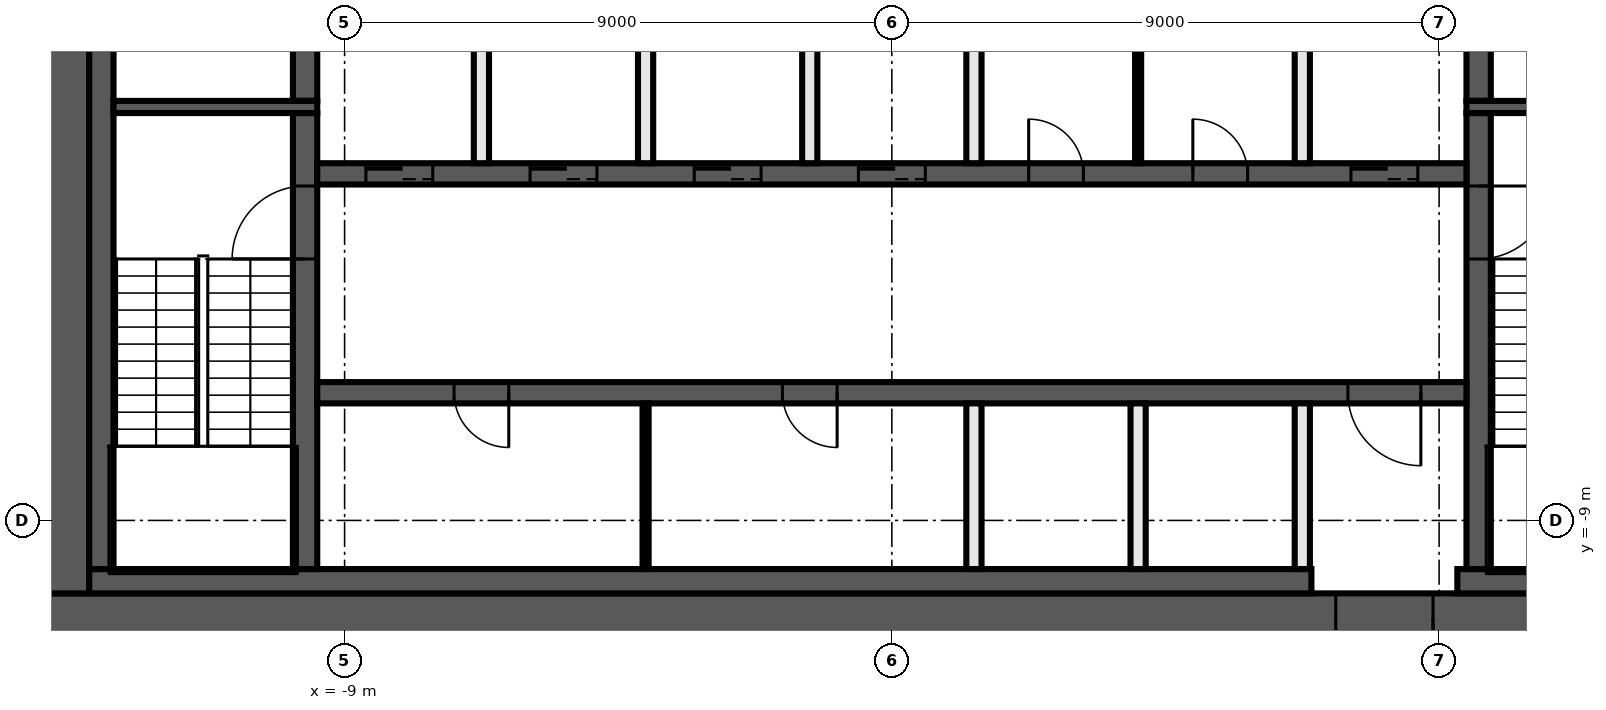
"""IFC4 building model, lengths in metres.
Left out: names, types, materials, properties, quantities, classifications, styles, units other than length and angle.
Written with IfcOpenShell. Run it as: python <this file> out.ifc"""

import sys

from ifc_helpers import new_model, si_unit, direction, frame, frame_2d, origin, place, context, subcontext, project, spatial, rectangle, extrude, element, fill, save


model = new_model("IFC4")
c1 = context("Model", 3, precision=1e-05, world=origin(), true_north=direction((0.0, 1.0)))
c2 = subcontext(c1, "Body", "Model", "MODEL_VIEW")
j1 = project(units=[si_unit("LENGTHUNIT", "METRE"), si_unit("PLANEANGLEUNIT", "RADIAN")], contexts=[c1])
p1 = place(None, origin())
s1 = spatial("IfcSite", under=j1, at=p1, CompositionType="ELEMENT")
p2 = place(p1, origin())
s2 = spatial("IfcBuilding", under=s1, at=p2, CompositionType="ELEMENT")
p3 = place(p2, frame((0.0, 0.0, 158.6)))
s3 = spatial("IfcBuildingStorey", under=s2, at=p3, CompositionType="ELEMENT", Elevation=158.6)
p4 = place(p3, frame((14.0, -10.6, 0.0), z_axis=(0.0, 0.0, 1.0), x_axis=(-1.0, 0.0, 0.0)))
e1 = element("IfcWall", 1, at=p4, inside=s3, PredefinedType="SHEAR", context=c2, shape_type="SweptSolid", body=[
    extrude(rectangle(XDim=28.0, YDim=0.8, at=frame_2d((14.0, 0.0))), origin(), (0.0, 0.0, 1.0), 3.82),
])
p5 = place(p4, frame((5.1, 0.0, 0.0)))
e2 = element("IfcOpeningElement", 2, at=p5, cuts=e1, PredefinedType="OPENING", context=c2, shape_type="SweptSolid", body=[
    extrude(rectangle(XDim=1.6, YDim=2.1, at=frame_2d((0.8, 1.05))), frame((0.0, 0.41, 0.0), z_axis=(0.0, -1.0, 0.0), x_axis=(1.0, 0.0, 0.0)), (0.0, 0.0, 1.0), 0.82),
])
p6 = place(p3, frame((-13.6, -10.2, 0.0), z_axis=(0.0, 0.0, 1.0), x_axis=(0.0, 1.0, 0.0)))
e3 = element("IfcWall", 3, at=p6, inside=s3, PredefinedType="SHEAR", context=c2, shape_type="SweptSolid", body=[
    extrude(rectangle(XDim=20.4, YDim=0.8, at=frame_2d((10.2, 0.0))), origin(), (0.0, 0.0, 1.0), 3.82),
])
p7 = place(p3, frame((13.2, -10.0, 0.0), z_axis=(0.0, 0.0, 1.0), x_axis=(-1.0, 0.0, 0.0)))
e4 = element("IfcWall", 4, at=p7, inside=s3, PredefinedType="SHEAR", context=c2, shape_type="SweptSolid", body=[
    extrude(rectangle(XDim=3.9, YDim=0.4, at=frame_2d((1.95, 0.0))), origin(), (0.0, 0.0, 1.0), 3.82),
])
p8 = place(p3, frame((6.9, -10.0, 0.0), z_axis=(0.0, 0.0, 1.0), x_axis=(-1.0, 0.0, 0.0)))
e5 = element("IfcWall", 5, at=p8, inside=s3, PredefinedType="SHEAR", context=c2, shape_type="SweptSolid", body=[
    extrude(rectangle(XDim=20.1, YDim=0.4, at=frame_2d((10.05, 0.0))), origin(), (0.0, 0.0, 1.0), 3.82),
])
p9 = place(p3, frame((-13.0, -9.8, 0.0), z_axis=(0.0, 0.0, 1.0), x_axis=(0.0, 1.0, 0.0)))
e6 = element("IfcWall", 6, at=p9, inside=s3, PredefinedType="SHEAR", context=c2, shape_type="SweptSolid", body=[
    extrude(rectangle(XDim=19.6, YDim=0.4, at=frame_2d((9.8, 0.0))), origin(), (0.0, 0.0, 1.0), 3.82),
])
p10 = place(p3, frame((9.65, -2.3, 0.0), z_axis=(0.0, 0.0, 1.0), x_axis=(0.0, -1.0, 0.0)))
e7 = element("IfcWall", 7, at=p10, inside=s3, PredefinedType="SHEAR", context=c2, shape_type="SweptSolid", body=[
    extrude(rectangle(XDim=7.5, YDim=0.4, at=frame_2d((3.75, 0.0))), origin(), (0.0, 0.0, 1.0), 3.82),
])
p11 = place(p10, frame((1.2, 0.0, 0.0)))
e8 = element("IfcOpeningElement", 8, at=p11, cuts=e7, PredefinedType="OPENING", context=c2, shape_type="SweptSolid", body=[
    extrude(rectangle(XDim=1.2, YDim=2.1, at=frame_2d((0.6, 1.05))), frame((0.0, 0.21, 0.0), z_axis=(0.0, -1.0, 0.0), x_axis=(1.0, 0.0, 0.0)), (0.0, 0.0, 1.0), 0.42),
])
p12 = place(p3, frame((9.65, 2.1, 0.0), z_axis=(0.0, 0.0, 1.0), x_axis=(0.0, -1.0, 0.0)))
e9 = element("IfcWall", 9, at=p12, inside=s3, PredefinedType="SHEAR", context=c2, shape_type="SweptSolid", body=[
    extrude(rectangle(XDim=4.2, YDim=0.4, at=frame_2d((2.1, 0.0))), origin(), (0.0, 0.0, 1.0), 3.82),
])
p13 = place(p12, frame((0.15, 0.0, 0.0)))
e10 = element("IfcOpeningElement", 10, at=p13, cuts=e9, PredefinedType="OPENING", context=c2, shape_type="SweptSolid", body=[
    extrude(rectangle(XDim=0.9, YDim=2.1, at=frame_2d((0.45, 1.05))), frame((0.0, 0.21, 0.0), z_axis=(0.0, -1.0, 0.0), x_axis=(1.0, 0.0, 0.0)), (0.0, 0.0, 1.0), 0.42),
])
p14 = place(p3, frame((-9.65, -9.8, 0.0), z_axis=(0.0, 0.0, 1.0), x_axis=(0.0, 1.0, 0.0)))
e11 = element("IfcWall", 11, at=p14, inside=s3, PredefinedType="SHEAR", context=c2, shape_type="SweptSolid", body=[
    extrude(rectangle(XDim=7.5, YDim=0.4, at=frame_2d((3.75, 0.0))), origin(), (0.0, 0.0, 1.0), 3.82),
])
p15 = place(p14, frame((5.1, 0.0, 0.0)))
e12 = element("IfcOpeningElement", 12, at=p15, cuts=e11, PredefinedType="OPENING", context=c2, shape_type="SweptSolid", body=[
    extrude(rectangle(XDim=1.2, YDim=2.1, at=frame_2d((0.6, 1.05))), frame((0.0, 0.21, 0.0), z_axis=(0.0, -1.0, 0.0), x_axis=(1.0, 0.0, 0.0)), (0.0, 0.0, 1.0), 0.42),
])
p16 = place(p3, frame((-9.65, -2.1, 0.0), z_axis=(0.0, 0.0, 1.0), x_axis=(0.0, 1.0, 0.0)))
e13 = element("IfcWall", 13, at=p16, inside=s3, PredefinedType="SHEAR", context=c2, shape_type="SweptSolid", body=[
    extrude(rectangle(XDim=4.2, YDim=0.4, at=frame_2d((2.1, 0.0))), origin(), (0.0, 0.0, 1.0), 3.82),
])
for number, where, z_axis, x_axis in (
    (14, (9.45, -2.2, 0.0), (0.0, 0.0, 1.0), (1.0, 0.0, 0.0)),
    (15, (-9.45, -2.2, 0.0), (0.0, 0.0, 1.0), (-1.0, 0.0, 0.0)),
):
    element("IfcWall", number, at=place(p3, frame(where, z_axis=z_axis, x_axis=x_axis)), inside=s3, PredefinedType="SHEAR", context=c2, shape_type="SweptSolid", body=[
        extrude(rectangle(XDim=3.35, YDim=0.2, at=frame_2d((1.675, 0.0))), origin(), (0.0, 0.0, 1.0), 3.82),
    ])
p17 = place(p3, frame((-9.45, -3.3, 0.0), z_axis=(0.0, 0.0, 1.0), x_axis=(1.0, 0.0, 0.0)))
e16 = element("IfcWall", 16, at=p17, inside=s3, PredefinedType="SHEAR", context=c2, shape_type="SweptSolid", body=[
    extrude(rectangle(XDim=18.9, YDim=0.35, at=frame_2d((9.45, 0.0))), origin(), (0.0, 0.0, 1.0), 3.82),
])
p18 = place(p17, frame((0.8, 0.0, 0.0)))
e17 = element("IfcOpeningElement", 17, at=p18, cuts=e16, PredefinedType="OPENING", context=c2, shape_type="SweptSolid", body=[
    extrude(rectangle(XDim=1.1, YDim=2.1, at=frame_2d((0.55, 1.05))), frame((0.0, 0.185, 0.0), z_axis=(0.0, -1.0, 0.0), x_axis=(1.0, 0.0, 0.0)), (0.0, 0.0, 1.0), 0.37),
])
p19 = place(p17, frame((3.5, 0.0, 0.0)))
e18 = element("IfcOpeningElement", 18, at=p19, cuts=e16, PredefinedType="OPENING", context=c2, shape_type="SweptSolid", body=[
    extrude(rectangle(XDim=1.1, YDim=2.1, at=frame_2d((0.55, 1.05))), frame((0.0, 0.185, 0.0), z_axis=(0.0, -1.0, 0.0), x_axis=(1.0, 0.0, 0.0)), (0.0, 0.0, 1.0), 0.37),
])
p20 = place(p17, frame((6.2, 0.0, 0.0)))
e19 = element("IfcOpeningElement", 19, at=p20, cuts=e16, PredefinedType="OPENING", context=c2, shape_type="SweptSolid", body=[
    extrude(rectangle(XDim=1.1, YDim=2.1, at=frame_2d((0.55, 1.05))), frame((0.0, 0.185, 0.0), z_axis=(0.0, -1.0, 0.0), x_axis=(1.0, 0.0, 0.0)), (0.0, 0.0, 1.0), 0.37),
])
p21 = place(p17, frame((8.9, 0.0, 0.0)))
e20 = element("IfcOpeningElement", 20, at=p21, cuts=e16, PredefinedType="OPENING", context=c2, shape_type="SweptSolid", body=[
    extrude(rectangle(XDim=1.1, YDim=2.1, at=frame_2d((0.55, 1.05))), frame((0.0, 0.185, 0.0), z_axis=(0.0, -1.0, 0.0), x_axis=(1.0, 0.0, 0.0)), (0.0, 0.0, 1.0), 0.37),
])
p22 = place(p17, frame((17.0, 0.0, 0.0)))
e21 = element("IfcOpeningElement", 21, at=p22, cuts=e16, PredefinedType="OPENING", context=c2, shape_type="SweptSolid", body=[
    extrude(rectangle(XDim=1.1, YDim=2.1, at=frame_2d((0.55, 1.05))), frame((0.0, 0.185, 0.0), z_axis=(0.0, -1.0, 0.0), x_axis=(1.0, 0.0, 0.0)), (0.0, 0.0, 1.0), 0.37),
])
p23 = place(p17, frame((11.7, 0.0, 0.0)))
e22 = element("IfcOpeningElement", 22, at=p23, cuts=e16, PredefinedType="OPENING", context=c2, shape_type="SweptSolid", body=[
    extrude(rectangle(XDim=0.9, YDim=2.1, at=frame_2d((0.45, 1.05))), frame((0.0, 0.185, 0.0), z_axis=(0.0, -1.0, 0.0), x_axis=(1.0, 0.0, 0.0)), (0.0, 0.0, 1.0), 0.37),
])
p24 = place(p17, frame((14.4, 0.0, 0.0)))
e23 = element("IfcOpeningElement", 23, at=p24, cuts=e16, PredefinedType="OPENING", context=c2, shape_type="SweptSolid", body=[
    extrude(rectangle(XDim=0.9, YDim=2.1, at=frame_2d((0.45, 1.05))), frame((0.0, 0.185, 0.0), z_axis=(0.0, -1.0, 0.0), x_axis=(1.0, 0.0, 0.0)), (0.0, 0.0, 1.0), 0.37),
])
p25 = place(p3, frame((9.45, -6.9, 0.0), z_axis=(0.0, 0.0, 1.0), x_axis=(-1.0, 0.0, 0.0)))
e24 = element("IfcWall", 24, at=p25, inside=s3, PredefinedType="SHEAR", context=c2, shape_type="SweptSolid", body=[
    extrude(rectangle(XDim=18.9, YDim=0.35, at=frame_2d((9.45, 0.0))), origin(), (0.0, 0.0, 1.0), 3.82),
])
p26 = place(p25, frame((0.75, 0.0, 0.0)))
e25 = element("IfcOpeningElement", 25, at=p26, cuts=e24, PredefinedType="OPENING", context=c2, shape_type="SweptSolid", body=[
    extrude(rectangle(XDim=1.2, YDim=2.1, at=frame_2d((0.6, 1.05))), frame((0.0, 0.185, 0.0), z_axis=(0.0, -1.0, 0.0), x_axis=(1.0, 0.0, 0.0)), (0.0, 0.0, 1.0), 0.37),
])
p27 = place(p25, frame((15.75, 0.0, 0.0)))
e26 = element("IfcOpeningElement", 26, at=p27, cuts=e24, PredefinedType="OPENING", context=c2, shape_type="SweptSolid", body=[
    extrude(rectangle(XDim=0.9, YDim=2.1, at=frame_2d((0.45, 1.05))), frame((0.0, 0.185, 0.0), z_axis=(0.0, -1.0, 0.0), x_axis=(1.0, 0.0, 0.0)), (0.0, 0.0, 1.0), 0.37),
])
p28 = place(p25, frame((10.35, 0.0, 0.0)))
e27 = element("IfcOpeningElement", 27, at=p28, cuts=e24, PredefinedType="OPENING", context=c2, shape_type="SweptSolid", body=[
    extrude(rectangle(XDim=0.9, YDim=2.1, at=frame_2d((0.45, 1.05))), frame((0.0, 0.185, 0.0), z_axis=(0.0, -1.0, 0.0), x_axis=(1.0, 0.0, 0.0)), (0.0, 0.0, 1.0), 0.37),
])
for number, where, z_axis, x_axis in (
    (28, (6.75, -9.8, 0.0), (0.0, 0.0, 1.0), (0.0, 1.0, 0.0)),
    (29, (6.75, -3.125, 0.0), (0.0, 0.0, 1.0), (0.0, 1.0, 0.0)),
):
    element("IfcWall", number, at=place(p3, frame(where, z_axis=z_axis, x_axis=x_axis)), inside=s3, PredefinedType="SOLIDWALL", context=c2, shape_type="SweptSolid", body=[
        extrude(rectangle(XDim=2.725, YDim=0.25, at=frame_2d((1.363, 0.0))), origin(), (0.0, 0.0, 1.0), 3.82),
    ])
p29 = place(p3, frame((4.05, -3.125, 0.0), z_axis=(0.0, 0.0, 1.0), x_axis=(0.0, 1.0, 0.0)))
e30 = element("IfcWall", 30, at=p29, inside=s3, PredefinedType="PARTITIONING", context=c2, shape_type="SweptSolid", body=[
    extrude(rectangle(XDim=2.725, YDim=0.1, at=frame_2d((1.363, 0.0))), origin(), (0.0, 0.0, 1.0), 3.82),
])
for number, where, z_axis, x_axis in (
    (31, (4.05, -9.8, 0.0), (0.0, 0.0, 1.0), (0.0, 1.0, 0.0)),
    (32, (1.35, -9.8, 0.0), (0.0, 0.0, 1.0), (0.0, 1.0, 0.0)),
    (33, (1.35, -3.125, 0.0), (0.0, 0.0, 1.0), (0.0, 1.0, 0.0)),
    (34, (-1.35, -3.125, 0.0), (0.0, 0.0, 1.0), (0.0, 1.0, 0.0)),
):
    element("IfcWall", number, at=place(p3, frame(where, z_axis=z_axis, x_axis=x_axis)), inside=s3, PredefinedType="SOLIDWALL", context=c2, shape_type="SweptSolid", body=[
        extrude(rectangle(XDim=2.725, YDim=0.25, at=frame_2d((1.363, 0.0))), origin(), (0.0, 0.0, 1.0), 3.82),
    ])
p30 = place(p3, frame((-4.05, -9.8, 0.0), z_axis=(0.0, 0.0, 1.0), x_axis=(0.0, 1.0, 0.0)))
e35 = element("IfcWall", 35, at=p30, inside=s3, PredefinedType="PARTITIONING", context=c2, shape_type="SweptSolid", body=[
    extrude(rectangle(XDim=2.725, YDim=0.1, at=frame_2d((1.363, 0.0))), origin(), (0.0, 0.0, 1.0), 3.82),
])
for number, where, z_axis, x_axis in (
    (36, (-4.05, -3.125, 0.0), (0.0, 0.0, 1.0), (0.0, 1.0, 0.0)),
    (37, (-6.75, -3.125, 0.0), (0.0, 0.0, 1.0), (0.0, 1.0, 0.0)),
):
    element("IfcWall", number, at=place(p3, frame(where, z_axis=z_axis, x_axis=x_axis)), inside=s3, PredefinedType="SOLIDWALL", context=c2, shape_type="SweptSolid", body=[
        extrude(rectangle(XDim=2.725, YDim=0.25, at=frame_2d((1.363, 0.0))), origin(), (0.0, 0.0, 1.0), 3.82),
    ])
p31 = place(p18, origin())
e38 = element("IfcDoor", 38, at=p31, inside=s3, OperationType="DOUBLE_DOOR_SLIDING", PredefinedType="DOOR", context=c2, shape_type="SweptSolid", body=[
    extrude(rectangle(XDim=1.1, YDim=2.1, at=frame_2d((0.55, 1.05))), frame((0.0, 0.025, 0.0), z_axis=(0.0, -1.0, 0.0), x_axis=(1.0, 0.0, 0.0)), (0.0, 0.0, 1.0), 0.05),
])
fill(e17, e38)
p32 = place(p19, origin())
e39 = element("IfcDoor", 39, at=p32, inside=s3, OperationType="DOUBLE_DOOR_SLIDING", PredefinedType="DOOR", context=c2, shape_type="SweptSolid", body=[
    extrude(rectangle(XDim=1.1, YDim=2.1, at=frame_2d((0.55, 1.05))), frame((0.0, 0.025, 0.0), z_axis=(0.0, -1.0, 0.0), x_axis=(1.0, 0.0, 0.0)), (0.0, 0.0, 1.0), 0.05),
])
fill(e18, e39)
p33 = place(p20, origin())
e40 = element("IfcDoor", 40, at=p33, inside=s3, OperationType="DOUBLE_DOOR_SLIDING", PredefinedType="DOOR", context=c2, shape_type="SweptSolid", body=[
    extrude(rectangle(XDim=1.1, YDim=2.1, at=frame_2d((0.55, 1.05))), frame((0.0, 0.025, 0.0), z_axis=(0.0, -1.0, 0.0), x_axis=(1.0, 0.0, 0.0)), (0.0, 0.0, 1.0), 0.05),
])
fill(e19, e40)
p34 = place(p21, origin())
e41 = element("IfcDoor", 41, at=p34, inside=s3, OperationType="DOUBLE_DOOR_SLIDING", PredefinedType="DOOR", context=c2, shape_type="SweptSolid", body=[
    extrude(rectangle(XDim=1.1, YDim=2.1, at=frame_2d((0.55, 1.05))), frame((0.0, 0.025, 0.0), z_axis=(0.0, -1.0, 0.0), x_axis=(1.0, 0.0, 0.0)), (0.0, 0.0, 1.0), 0.05),
])
fill(e20, e41)
p35 = place(p22, origin())
e42 = element("IfcDoor", 42, at=p35, inside=s3, OperationType="DOUBLE_DOOR_SLIDING", PredefinedType="DOOR", context=c2, shape_type="SweptSolid", body=[
    extrude(rectangle(XDim=1.1, YDim=2.1, at=frame_2d((0.55, 1.05))), frame((0.0, 0.025, 0.0), z_axis=(0.0, -1.0, 0.0), x_axis=(1.0, 0.0, 0.0)), (0.0, 0.0, 1.0), 0.05),
])
fill(e21, e42)
p36 = place(p5, origin())
e43 = element("IfcDoor", 43, at=p36, inside=s3, OperationType="DOUBLE_DOOR_SINGLE_SWING", PredefinedType="DOOR", context=c2, shape_type="SweptSolid", body=[
    extrude(rectangle(XDim=1.6, YDim=2.1, at=frame_2d((0.8, 1.05))), frame((0.0, 0.025, 0.0), z_axis=(0.0, -1.0, 0.0), x_axis=(1.0, 0.0, 0.0)), (0.0, 0.0, 1.0), 0.05),
])
fill(e2, e43)
p37 = place(p26, origin())
e44 = element("IfcDoor", 44, at=p37, inside=s3, OperationType="SINGLE_SWING_LEFT", PredefinedType="DOOR", context=c2, shape_type="SweptSolid", body=[
    extrude(rectangle(XDim=1.2, YDim=2.1, at=frame_2d((0.6, 1.05))), frame((0.0, 0.025, 0.0), z_axis=(0.0, -1.0, 0.0), x_axis=(1.0, 0.0, 0.0)), (0.0, 0.0, 1.0), 0.05),
])
fill(e25, e44)
p38 = place(p23, origin())
e45 = element("IfcDoor", 45, at=p38, inside=s3, OperationType="SINGLE_SWING_RIGHT", PredefinedType="DOOR", context=c2, shape_type="SweptSolid", body=[
    extrude(rectangle(XDim=0.9, YDim=2.1, at=frame_2d((0.45, 1.05))), frame((0.0, 0.025, 0.0), z_axis=(0.0, -1.0, 0.0), x_axis=(1.0, 0.0, 0.0)), (0.0, 0.0, 1.0), 0.05),
])
fill(e22, e45)
p39 = place(p24, origin())
e46 = element("IfcDoor", 46, at=p39, inside=s3, OperationType="SINGLE_SWING_LEFT", PredefinedType="DOOR", context=c2, shape_type="SweptSolid", body=[
    extrude(rectangle(XDim=0.9, YDim=2.1, at=frame_2d((0.45, 1.05))), frame((0.0, 0.025, 0.0), z_axis=(0.0, -1.0, 0.0), x_axis=(1.0, 0.0, 0.0)), (0.0, 0.0, 1.0), 0.05),
])
fill(e23, e46)
p40 = place(p27, origin())
e47 = element("IfcDoor", 47, at=p40, inside=s3, OperationType="SINGLE_SWING_RIGHT", PredefinedType="DOOR", context=c2, shape_type="SweptSolid", body=[
    extrude(rectangle(XDim=0.9, YDim=2.1, at=frame_2d((0.45, 1.05))), frame((0.0, 0.025, 0.0), z_axis=(0.0, -1.0, 0.0), x_axis=(1.0, 0.0, 0.0)), (0.0, 0.0, 1.0), 0.05),
])
fill(e26, e47)
p41 = place(p28, origin())
e48 = element("IfcDoor", 48, at=p41, inside=s3, OperationType="SINGLE_SWING_LEFT", PredefinedType="DOOR", context=c2, shape_type="SweptSolid", body=[
    extrude(rectangle(XDim=0.9, YDim=2.1, at=frame_2d((0.45, 1.05))), frame((0.0, 0.025, 0.0), z_axis=(0.0, -1.0, 0.0), x_axis=(1.0, 0.0, 0.0)), (0.0, 0.0, 1.0), 0.05),
])
fill(e27, e48)
p42 = place(p11, origin())
e49 = element("IfcDoor", 49, at=p42, inside=s3, OperationType="SINGLE_SWING_RIGHT", PredefinedType="DOOR", context=c2, shape_type="SweptSolid", body=[
    extrude(rectangle(XDim=1.2, YDim=2.1, at=frame_2d((0.6, 1.05))), frame((0.0, 0.025, 0.0), z_axis=(0.0, -1.0, 0.0), x_axis=(1.0, 0.0, 0.0)), (0.0, 0.0, 1.0), 0.05),
])
fill(e8, e49)
p43 = place(p15, origin())
e50 = element("IfcDoor", 50, at=p43, inside=s3, OperationType="SINGLE_SWING_LEFT", PredefinedType="DOOR", context=c2, shape_type="SweptSolid", body=[
    extrude(rectangle(XDim=1.2, YDim=2.1, at=frame_2d((0.6, 1.05))), frame((0.0, 0.025, 0.0), z_axis=(0.0, -1.0, 0.0), x_axis=(1.0, 0.0, 0.0)), (0.0, 0.0, 1.0), 0.05),
])
fill(e12, e50)
save(model, sys.argv[1])
